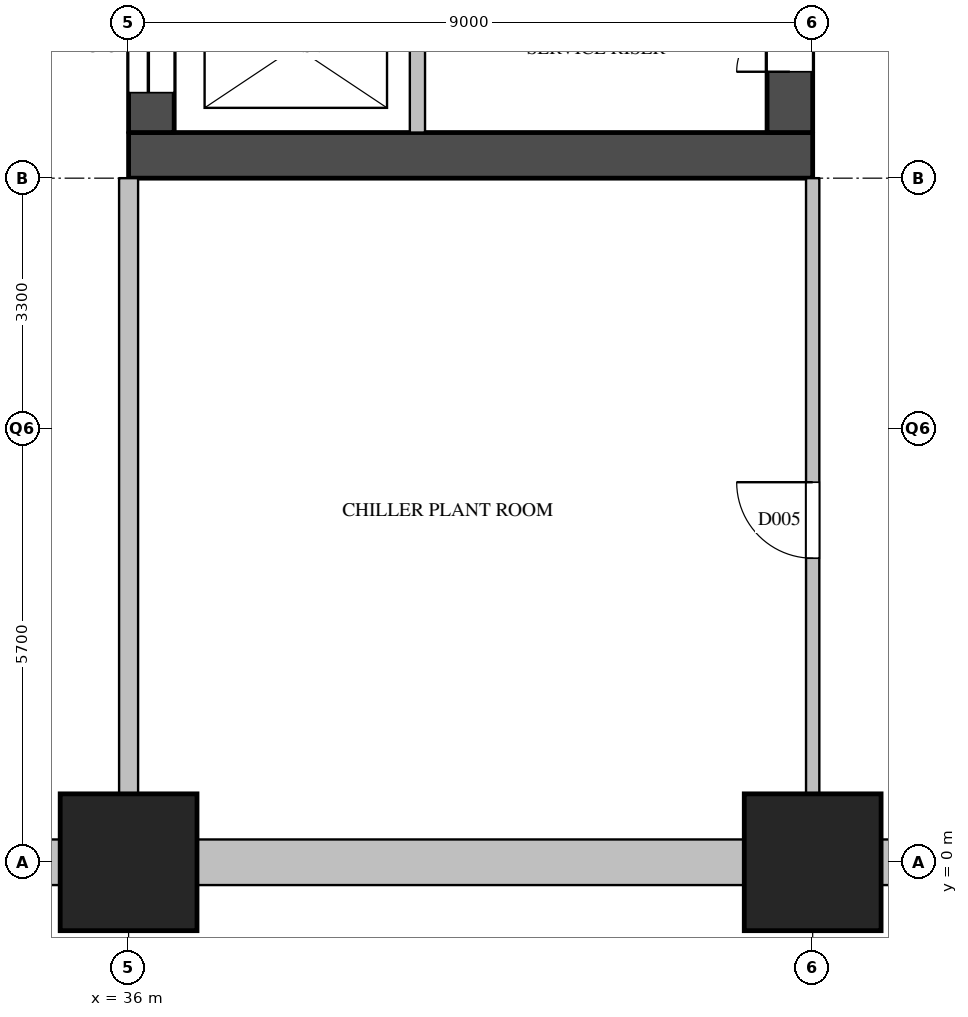
"""IFC4 building model, lengths in metres.
Left out: names, types, materials, properties, quantities, classifications, styles, units other than length and angle.
Written with IfcOpenShell. Run it as: python <this file> out.ifc"""

import sys

from ifc_helpers import new_model, si_unit, direction, frame, frame_2d, origin, origin_2d, place, context, subcontext, project, spatial, rectangle, extrude, element, fill, save


model = new_model("IFC4")
c1 = context("Model", 3, precision=1e-05, world=origin(), true_north=direction((0.0, 1.0)))
c2 = subcontext(c1, "Body", "Model", "MODEL_VIEW")
j1 = project(units=[si_unit("LENGTHUNIT", "METRE"), si_unit("PLANEANGLEUNIT", "RADIAN")], contexts=[c1])
p1 = place(None, origin())
s1 = spatial("IfcSite", under=j1, at=p1, CompositionType="ELEMENT")
p2 = place(p1, origin())
s2 = spatial("IfcBuilding", under=s1, at=p2, CompositionType="ELEMENT")
p3 = place(p2, frame((0.0, 0.0, -6.0)))
s3 = spatial("IfcBuildingStorey", under=s2, at=p3, CompositionType="ELEMENT", Elevation=-6.0)
for number, where, z_axis, x_axis in (
    (1, (36.0, 0.0, 0.0), (0.0, 0.0, 1.0), (1.0, 0.0, 0.0)),
    (2, (45.0, 0.0, 0.0), (0.0, 0.0, 1.0), (1.0, 0.0, 0.0)),
):
    element("IfcColumn", number, at=place(p3, frame(where, z_axis=z_axis, x_axis=x_axis)), inside=s3, PredefinedType="COLUMN", context=c2, shape_type="SweptSolid", body=[
        extrude(rectangle(XDim=1.8, YDim=1.8, at=origin_2d()), origin(), (0.0, 0.0, 1.0), 6.0),
    ])
for number, where, z_axis, x_axis in (
    (3, (27.9, 0.0, 0.0), (0.0, 0.0, 1.0), (1.0, 0.0, 0.0)),
    (4, (36.9, 0.0, 0.0), (0.0, 0.0, 1.0), (1.0, 0.0, 0.0)),
):
    element("IfcWall", number, at=place(p3, frame(where, z_axis=z_axis, x_axis=x_axis)), inside=s3, PredefinedType="SOLIDWALL", context=c2, shape_type="SweptSolid", body=[
        extrude(rectangle(XDim=7.2, YDim=0.6, at=frame_2d((3.6, 0.0))), origin(), (0.0, 0.0, 1.0), 5.59),
    ])
p4 = place(p3, frame((45.9, 0.0, 0.0), z_axis=(0.0, 0.0, 1.0), x_axis=(1.0, 0.0, 0.0)))
e5 = element("IfcWall", 5, at=p4, inside=s3, PredefinedType="SOLIDWALL", context=c2, shape_type="SweptSolid", body=[
    extrude(rectangle(XDim=3.6, YDim=0.6, at=frame_2d((1.8, 0.0))), origin(), (0.0, 0.0, 1.0), 5.59),
])
p5 = place(p3, frame((36.0, 9.3, 0.0), z_axis=(0.0, 0.0, 1.0), x_axis=(1.0, 0.0, 0.0)))
e6 = element("IfcWall", 6, at=p5, inside=s3, PredefinedType="SHEAR", context=c2, shape_type="SweptSolid", body=[
    extrude(rectangle(XDim=9.0, YDim=0.6, at=frame_2d((4.5, 0.0))), origin(), (0.0, 0.0, 1.0), 5.59),
])
p6 = place(p3, frame((36.3, 9.6, 0.0), z_axis=(0.0, 0.0, 1.0), x_axis=(0.0, 1.0, 0.0)))
e7 = element("IfcWall", 7, at=p6, inside=s3, PredefinedType="SHEAR", context=c2, shape_type="SweptSolid", body=[
    extrude(rectangle(XDim=12.3, YDim=0.6, at=frame_2d((6.15, 0.0))), origin(), (0.0, 0.0, 1.0), 5.59),
])
p7 = place(p6, frame((0.525, 0.0, 0.0)))
e8 = element("IfcOpeningElement", 8, at=p7, cuts=e7, PredefinedType="OPENING", context=c2, shape_type="SweptSolid", body=[
    extrude(rectangle(XDim=1.2, YDim=2.1, at=frame_2d((0.6, 1.05))), frame((0.0, 0.31, 0.0), z_axis=(0.0, -1.0, 0.0), x_axis=(1.0, 0.0, 0.0)), (0.0, 0.0, 1.0), 0.62),
])
p8 = place(p6, frame((4.8, 0.0, 0.0)))
e9 = element("IfcOpeningElement", 9, at=p8, cuts=e7, PredefinedType="OPENING", context=c2, shape_type="SweptSolid", body=[
    extrude(rectangle(XDim=1.0, YDim=2.1, at=frame_2d((0.5, 1.05))), frame((0.0, 0.31, 0.0), z_axis=(0.0, -1.0, 0.0), x_axis=(1.0, 0.0, 0.0)), (0.0, 0.0, 1.0), 0.62),
])
p9 = place(p3, frame((44.7, 9.6, 0.0), z_axis=(0.0, 0.0, 1.0), x_axis=(0.0, 1.0, 0.0)))
e10 = element("IfcWall", 10, at=p9, inside=s3, PredefinedType="SHEAR", context=c2, shape_type="SweptSolid", body=[
    extrude(rectangle(XDim=12.3, YDim=0.6, at=frame_2d((6.15, 0.0))), origin(), (0.0, 0.0, 1.0), 5.59),
])
p10 = place(p9, frame((0.8, 0.0, 0.0)))
e11 = element("IfcOpeningElement", 11, at=p10, cuts=e10, PredefinedType="OPENING", context=c2, shape_type="SweptSolid", body=[
    extrude(rectangle(XDim=0.7, YDim=2.1, at=frame_2d((0.35, 1.05))), frame((0.0, 0.31, 0.0), z_axis=(0.0, -1.0, 0.0), x_axis=(1.0, 0.0, 0.0)), (0.0, 0.0, 1.0), 0.62),
])
p11 = place(p9, frame((4.8, 0.0, 0.0)))
e12 = element("IfcOpeningElement", 12, at=p11, cuts=e10, PredefinedType="OPENING", context=c2, shape_type="SweptSolid", body=[
    extrude(rectangle(XDim=1.0, YDim=2.1, at=frame_2d((0.5, 1.05))), frame((0.0, 0.31, 0.0), z_axis=(0.0, -1.0, 0.0), x_axis=(1.0, 0.0, 0.0)), (0.0, 0.0, 1.0), 0.62),
])
p12 = place(p3, frame((39.8, 9.6, 0.0), z_axis=(0.0, 0.0, 1.0), x_axis=(0.0, 1.0, 0.0)))
e13 = element("IfcWall", 13, at=p12, inside=s3, PredefinedType="SOLIDWALL", context=c2, shape_type="SweptSolid", body=[
    extrude(rectangle(XDim=2.25, YDim=0.2, at=frame_2d((1.125, 0.0))), origin(), (0.0, 0.0, 1.0), 5.59),
])
p13 = place(p3, frame((45.0, 0.0, 0.0), z_axis=(0.0, 0.0, 1.0), x_axis=(0.0, 1.0, 0.0)))
e14 = element("IfcWall", 14, at=p13, inside=s3, PredefinedType="PARTITIONING", context=c2, shape_type="SweptSolid", body=[
    extrude(rectangle(XDim=9.0, YDim=0.175, at=frame_2d((4.5, 0.0))), origin(), (0.0, 0.0, 1.0), 5.59),
])
p14 = place(p13, frame((4.0, 0.0, 0.0)))
e15 = element("IfcOpeningElement", 15, at=p14, cuts=e14, PredefinedType="OPENING", context=c2, shape_type="SweptSolid", body=[
    extrude(rectangle(XDim=1.0, YDim=2.1, at=frame_2d((0.5, 1.05))), frame((0.0, 0.097, 0.0), z_axis=(0.0, -1.0, 0.0), x_axis=(1.0, 0.0, 0.0)), (0.0, 0.0, 1.0), 0.195),
])
p15 = place(p3, frame((36.0, 0.0, 0.0), z_axis=(0.0, 0.0, 1.0), x_axis=(0.0, 1.0, 0.0)))
e16 = element("IfcWall", 16, at=p15, inside=s3, PredefinedType="PARTITIONING", context=c2, shape_type="SweptSolid", body=[
    extrude(rectangle(XDim=9.0, YDim=0.25, at=frame_2d((4.5, 0.0))), origin(), (0.0, 0.0, 1.0), 5.59),
])
p16 = place(p7, origin())
e17 = element("IfcDoor", 17, at=p16, inside=s3, OperationType="SLIDING_TO_LEFT", PredefinedType="DOOR", context=c2, shape_type="SweptSolid", body=[
    extrude(rectangle(XDim=1.2, YDim=2.1, at=frame_2d((0.6, 1.05))), frame((0.0, 0.025, 0.0), z_axis=(0.0, -1.0, 0.0), x_axis=(1.0, 0.0, 0.0)), (0.0, 0.0, 1.0), 0.05),
])
fill(e8, e17)
p17 = place(p10, origin())
e18 = element("IfcDoor", 18, at=p17, inside=s3, OperationType="SINGLE_SWING_LEFT", PredefinedType="DOOR", context=c2, shape_type="SweptSolid", body=[
    extrude(rectangle(XDim=0.7, YDim=2.1, at=frame_2d((0.35, 1.05))), frame((0.0, 0.025, 0.0), z_axis=(0.0, -1.0, 0.0), x_axis=(1.0, 0.0, 0.0)), (0.0, 0.0, 1.0), 0.05),
])
fill(e11, e18)
p18 = place(p14, origin())
e19 = element("IfcDoor", 19, at=p18, inside=s3, OperationType="SINGLE_SWING_RIGHT", PredefinedType="DOOR", context=c2, shape_type="SweptSolid", body=[
    extrude(rectangle(XDim=1.0, YDim=2.1, at=frame_2d((0.5, 1.05))), frame((0.0, 0.025, 0.0), z_axis=(0.0, -1.0, 0.0), x_axis=(1.0, 0.0, 0.0)), (0.0, 0.0, 1.0), 0.05),
])
fill(e15, e19)
save(model, sys.argv[1])
